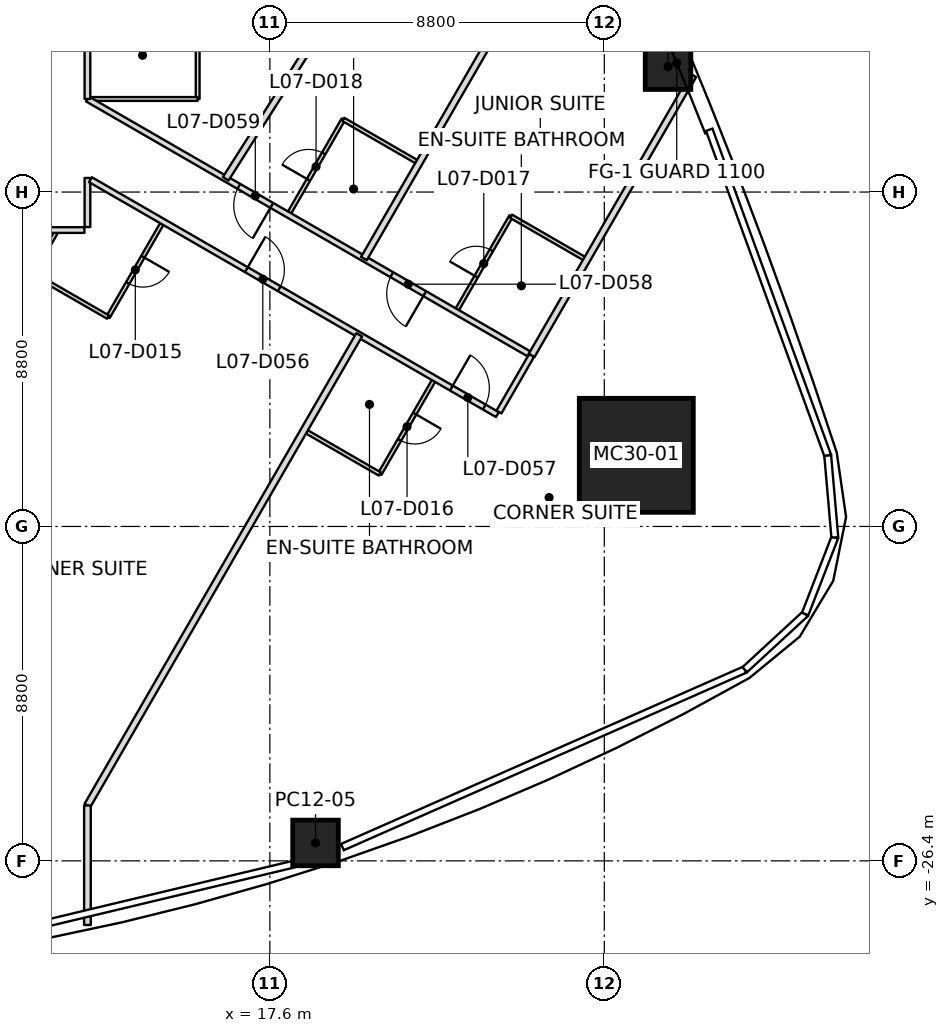
"""IFC4 building model, lengths in metres.
Left out: names, types, materials, properties, quantities, classifications, styles, units other than length and angle.
Written with IfcOpenShell. Run it as: python <this file> out.ifc"""

import sys

from ifc_helpers import new_model, si_unit, direction, frame, frame_2d, origin, origin_2d, place, context, subcontext, project, spatial, rectangle, extrude, clip, halfspace, element, fill, save


model = new_model("IFC4")
c1 = context("Model", 3, precision=1e-05, world=origin(), true_north=direction((0.0, 1.0)))
c2 = subcontext(c1, "Body", "Model", "MODEL_VIEW")
j1 = project(units=[si_unit("LENGTHUNIT", "METRE"), si_unit("PLANEANGLEUNIT", "RADIAN")], contexts=[c1])
p1 = place(None, origin())
s1 = spatial("IfcSite", under=j1, at=p1, CompositionType="ELEMENT")
p2 = place(p1, origin())
s2 = spatial("IfcBuilding", under=s1, at=p2, CompositionType="ELEMENT")
p3 = place(p2, frame((0.0, 0.0, 48.0)))
s3 = spatial("IfcBuildingStorey", under=s2, at=p3, CompositionType="ELEMENT", Elevation=48.0)
p4 = place(p3, frame((27.242, -15.728, 0.0), z_axis=(-0.030597838594, 0.017672889533, 0.99937552564), x_axis=(0.99953177652, 0.000541005533, 0.030593055416)))
e1 = element("IfcColumn", 1, at=p4, inside=s3, PredefinedType="COLUMN", context=c2, shape_type="SweptSolid", body=[
    clip(extrude(rectangle(XDim=3.0, YDim=3.0, at=origin_2d()), origin(), (0.0, 0.0, 1.0), 3.702), halfspace(frame((0.0, 0.0, 0.018)), True)),
])
p5 = place(p3, frame((18.802, -25.928, 0.0), z_axis=(-0.019020345186, 0.17825893475, 0.983799765527), x_axis=(0.950332394894, 0.308956292564, -0.037607824987)))
e2 = element("IfcColumn", 2, at=p5, inside=s3, PredefinedType="COLUMN", context=c2, shape_type="SweptSolid", body=[
    clip(clip(extrude(rectangle(XDim=1.2, YDim=1.2, at=origin_2d()), origin(), (0.0, 0.0, 1.0), 3.761), halfspace(frame((0.0, 0.0, 0.008)), True)), halfspace(frame((0.0, 0.0, 3.76)), False)),
])
p6 = place(p3, frame((28.077, -5.5, 0.0), z_axis=(-0.019526598325, 0.011016695677, 0.999748640596), x_axis=(-0.381957446123, 0.924011503162, -0.017642317722)))
e3 = element("IfcColumn", 3, at=p6, inside=s3, PredefinedType="COLUMN", context=c2, shape_type="SweptSolid", body=[
    clip(extrude(rectangle(XDim=1.2, YDim=1.2, at=origin_2d()), origin(), (0.0, 0.0, 1.0), 3.701), halfspace(frame((0.0, 0.0, 0.005)), True)),
])
p7 = place(p3, frame((19.95, -12.558, 0.0), z_axis=(0.0, 0.0, 1.0), x_axis=(-0.500004228592, -0.866022962392, 0.0)))
e4 = element("IfcWall", 4, at=p7, inside=s3, PredefinedType="PARTITIONING", context=c2, shape_type="SweptSolid", body=[
    extrude(rectangle(XDim=14.3, YDim=0.175, at=frame_2d((7.15, 0.0))), origin(), (0.0, 0.0, 1.0), 2.797),
])
p8 = place(p3, frame((12.8, -24.942, 0.0), z_axis=(0.0, 0.0, 1.0), x_axis=(0.0, -1.0, 0.0)))
e5 = element("IfcWall", 5, at=p8, inside=s3, PredefinedType="PARTITIONING", context=c2, shape_type="SweptSolid", body=[
    extrude(rectangle(XDim=3.146, YDim=0.175, at=frame_2d((1.573, 0.0))), origin(), (0.0, 0.0, 1.0), 2.934),
])
p9 = place(p3, frame((24.174, 3.728, 0.0), z_axis=(0.0, 0.0, 1.0), x_axis=(-0.536240308602, -0.844065359691, 0.0)))
e6 = element("IfcWall", 6, at=p9, inside=s3, PredefinedType="PARTITIONING", context=c2, shape_type="SweptSolid", body=[
    extrude(rectangle(XDim=14.428, YDim=0.175, at=frame_2d((7.214, 0.0))), origin(), (0.0, 0.0, 1.0), 2.947),
])
p10 = place(p3, frame((20.075, -10.551, 0.0), z_axis=(0.0, 0.0, 1.0), x_axis=(0.499996220184, 0.866027586051, 0.0)))
e7 = element("IfcWall", 7, at=p10, inside=s3, PredefinedType="PARTITIONING", context=c2, shape_type="SweptSolid", body=[
    extrude(rectangle(XDim=12.274, YDim=0.175, at=frame_2d((6.137, 0.0))), origin(), (0.0, 0.0, 1.0), 2.934),
])
p11 = place(p3, frame((24.488, -13.099, 0.0), z_axis=(0.0, 0.0, 1.0), x_axis=(0.500003147101, 0.866023586797, 0.0)))
e8 = element("IfcWall", 8, at=p11, inside=s3, PredefinedType="PARTITIONING", context=c2, shape_type="SweptSolid", body=[
    extrude(rectangle(XDim=8.508, YDim=0.175, at=frame_2d((4.254, 0.0))), origin(), (0.0, 0.0, 1.0), 2.934),
])
p12 = place(p3, frame((-12.72, -9.8, 0.0), z_axis=(0.0, 0.0, 1.0), x_axis=(1.0, 0.0, 0.0)))
e9 = element("IfcWall", 9, at=p12, inside=s3, PredefinedType="PARTITIONING", context=c2, shape_type="SweptSolid", body=[
    extrude(rectangle(XDim=25.44, YDim=0.15, at=frame_2d((12.72, 0.0))), origin(), (0.0, 0.0, 1.0), 2.947),
])
p13 = place(p12, frame((7.32, 0.0, 0.0)))
e10 = element("IfcOpeningElement", 10, at=p13, cuts=e9, PredefinedType="OPENING", context=c2, shape_type="SweptSolid", body=[
    extrude(rectangle(XDim=1.0, YDim=2.1, at=frame_2d((0.5, 1.05))), frame((0.0, 0.075, 0.0), z_axis=(0.0, -1.0, 0.0), x_axis=(1.0, 0.0, 0.0)), (0.0, 0.0, 1.0), 0.15),
])
p14 = place(p12, frame((11.52, 0.0, 0.0)))
e11 = element("IfcOpeningElement", 11, at=p14, cuts=e9, PredefinedType="OPENING", context=c2, shape_type="SweptSolid", body=[
    extrude(rectangle(XDim=1.0, YDim=2.1, at=frame_2d((0.5, 1.05))), frame((0.0, 0.075, 0.0), z_axis=(0.0, -1.0, 0.0), x_axis=(1.0, 0.0, 0.0)), (0.0, 0.0, 1.0), 0.15),
])
p15 = place(p12, frame((15.72, 0.0, 0.0)))
e12 = element("IfcOpeningElement", 12, at=p15, cuts=e9, PredefinedType="OPENING", context=c2, shape_type="SweptSolid", body=[
    extrude(rectangle(XDim=1.0, YDim=2.1, at=frame_2d((0.5, 1.05))), frame((0.0, 0.075, 0.0), z_axis=(0.0, -1.0, 0.0), x_axis=(1.0, 0.0, 0.0)), (0.0, 0.0, 1.0), 0.15),
])
p16 = place(p12, frame((19.92, 0.0, 0.0)))
e13 = element("IfcOpeningElement", 13, at=p16, cuts=e9, PredefinedType="OPENING", context=c2, shape_type="SweptSolid", body=[
    extrude(rectangle(XDim=1.0, YDim=2.1, at=frame_2d((0.5, 1.05))), frame((0.0, 0.075, 0.0), z_axis=(0.0, -1.0, 0.0), x_axis=(1.0, 0.0, 0.0)), (0.0, 0.0, 1.0), 0.15),
])
p17 = place(p3, frame((12.8, -9.72, 0.0), z_axis=(0.0, 0.0, 1.0), x_axis=(0.0, 1.0, 0.0)))
e14 = element("IfcWall", 14, at=p17, inside=s3, PredefinedType="PARTITIONING", context=c2, shape_type="SweptSolid", body=[
    extrude(rectangle(XDim=1.291, YDim=0.15, at=frame_2d((0.646, 0.0))), origin(), (0.0, 0.0, 1.0), 2.797),
])
p18 = place(p3, frame((12.879, -8.475, 0.0), z_axis=(0.0, 0.0, 1.0), x_axis=(0.866021836803, -0.500006178143, 0.0)))
e15 = element("IfcWall", 15, at=p18, inside=s3, PredefinedType="PARTITIONING", context=c2, shape_type="SweptSolid", body=[
    extrude(rectangle(XDim=12.365, YDim=0.15, at=frame_2d((6.182, 0.0))), origin(), (0.0, 0.0, 1.0), 2.797),
])
p19 = place(p18, frame((4.737, 0.0, 0.0)))
e16 = element("IfcOpeningElement", 16, at=p19, cuts=e15, PredefinedType="OPENING", context=c2, shape_type="SweptSolid", body=[
    extrude(rectangle(XDim=1.0, YDim=2.1, at=frame_2d((0.5, 1.05))), frame((0.0, 0.075, 0.0), z_axis=(0.0, -1.0, 0.0), x_axis=(1.0, 0.0, 0.0)), (0.0, 0.0, 1.0), 0.15),
])
p20 = place(p18, frame((10.965, 0.0, 0.0)))
e17 = element("IfcOpeningElement", 17, at=p20, cuts=e15, PredefinedType="OPENING", context=c2, shape_type="SweptSolid", body=[
    extrude(rectangle(XDim=1.0, YDim=2.1, at=frame_2d((0.5, 1.05))), frame((0.0, 0.075, 0.0), z_axis=(0.0, -1.0, 0.0), x_axis=(1.0, 0.0, 0.0)), (0.0, 0.0, 1.0), 0.15),
])
p21 = place(p3, frame((23.627, -14.588, 0.0), z_axis=(0.0, 0.0, 1.0), x_axis=(0.500062383118, 0.865989383878, 0.0)))
e18 = element("IfcWall", 18, at=p21, inside=s3, PredefinedType="PARTITIONING", context=c2, shape_type="SweptSolid", body=[
    extrude(rectangle(XDim=1.72, YDim=0.15, at=frame_2d((0.86, 0.0))), origin(), (0.0, 0.0, 1.0), 2.797),
])
p22 = place(p3, frame((24.418, -13.059, 0.0), z_axis=(0.0, 0.0, 1.0), x_axis=(-0.866024967305, 0.500000756004, 0.0)))
e19 = element("IfcWall", 19, at=p22, inside=s3, PredefinedType="PARTITIONING", context=c2, shape_type="SweptSolid", body=[
    extrude(rectangle(XDim=13.416, YDim=0.15, at=frame_2d((6.708, 0.0))), origin(), (0.0, 0.0, 1.0), 2.947),
])
p23 = place(p22, frame((3.168, 0.0, 0.0)))
e20 = element("IfcOpeningElement", 20, at=p23, cuts=e19, PredefinedType="OPENING", context=c2, shape_type="SweptSolid", body=[
    extrude(rectangle(XDim=1.0, YDim=2.1, at=frame_2d((0.5, 1.05))), frame((0.0, 0.075, 0.0), z_axis=(0.0, -1.0, 0.0), x_axis=(1.0, 0.0, 0.0)), (0.0, 0.0, 1.0), 0.15),
])
p24 = place(p22, frame((7.815, 0.0, 0.0)))
e21 = element("IfcOpeningElement", 21, at=p24, cuts=e19, PredefinedType="OPENING", context=c2, shape_type="SweptSolid", body=[
    extrude(rectangle(XDim=1.0, YDim=2.1, at=frame_2d((0.5, 1.05))), frame((0.0, 0.075, 0.0), z_axis=(0.0, -1.0, 0.0), x_axis=(1.0, 0.0, 0.0)), (0.0, 0.0, 1.0), 0.15),
])
p25 = place(p3, frame((12.8, -6.351, 0.0), z_axis=(0.0, 0.0, 1.0), x_axis=(0.0, 1.0, 0.0)))
e22 = element("IfcWall", 22, at=p25, inside=s3, PredefinedType="PARTITIONING", context=c2, shape_type="SweptSolid", body=[
    extrude(rectangle(XDim=16.071, YDim=0.15, at=frame_2d((8.035, 0.0))), origin(), (0.0, 0.0, 1.0), 3.017),
])
p26 = place(p25, frame((6.676, 0.0, 0.0)))
e23 = element("IfcOpeningElement", 23, at=p26, cuts=e22, PredefinedType="OPENING", context=c2, shape_type="SweptSolid", body=[
    extrude(rectangle(XDim=1.0, YDim=2.1, at=frame_2d((0.5, 1.05))), frame((0.0, 0.075, 0.0), z_axis=(0.0, -1.0, 0.0), x_axis=(1.0, 0.0, 0.0)), (0.0, 0.0, 1.0), 0.15),
])
p27 = place(p25, frame((14.751, 0.0, 0.0)))
e24 = element("IfcOpeningElement", 24, at=p27, cuts=e22, PredefinedType="OPENING", context=c2, shape_type="SweptSolid", body=[
    extrude(rectangle(XDim=1.0, YDim=2.1, at=frame_2d((0.5, 1.05))), frame((0.0, 0.075, 0.0), z_axis=(0.0, -1.0, 0.0), x_axis=(1.0, 0.0, 0.0)), (0.0, 0.0, 1.0), 0.15),
])
p28 = place(p3, frame((14.777, -9.605, 0.0), z_axis=(0.0, 0.0, 1.0), x_axis=(-0.499999802827, -0.866025517622, 0.0)))
e25 = element("IfcWall", 25, at=p28, inside=s3, PredefinedType="PARTITIONING", context=c2, shape_type="SweptSolid", body=[
    extrude(rectangle(XDim=2.87, YDim=0.1, at=frame_2d((1.435, 0.0))), origin(), (0.0, 0.0, 1.0), 2.797),
])
p29 = place(p28, frame((1.035, 0.0, 0.0)))
e26 = element("IfcOpeningElement", 26, at=p29, cuts=e25, PredefinedType="OPENING", context=c2, shape_type="SweptSolid", body=[
    extrude(rectangle(XDim=0.8, YDim=2.1, at=frame_2d((0.4, 1.05))), frame((0.0, 0.05, 0.0), z_axis=(0.0, -1.0, 0.0), x_axis=(1.0, 0.0, 0.0)), (0.0, 0.0, 1.0), 0.1),
])
p30 = place(p3, frame((13.342, -12.091, 0.0), z_axis=(0.0, 0.0, 1.0), x_axis=(-0.86602648383, 0.499998129301, 0.0)))
e27 = element("IfcWall", 27, at=p30, inside=s3, PredefinedType="PARTITIONING", context=c2, shape_type="SweptSolid", body=[
    extrude(rectangle(XDim=2.3, YDim=0.1, at=frame_2d((1.15, 0.0))), origin(), (0.0, 0.0, 1.0), 2.947),
])
p31 = place(p3, frame((11.35, -10.941, 0.0), z_axis=(0.0, 0.0, 1.0), x_axis=(0.499865263774, 0.866103179807, 0.0)))
e28 = element("IfcWall", 28, at=p31, inside=s3, PredefinedType="PARTITIONING", context=c2, shape_type="SweptSolid", body=[
    extrude(rectangle(XDim=1.282, YDim=0.1, at=frame_2d((0.641, 0.0))), origin(), (0.0, 0.0, 1.0), 3.15),
])
p32 = place(p3, frame((15.7, -4.051, 0.0), z_axis=(0.0, 0.0, 1.0), x_axis=(0.0, -1.0, 0.0)))
e29 = element("IfcWall", 29, at=p32, inside=s3, PredefinedType="PARTITIONING", context=c2, shape_type="SweptSolid", body=[
    extrude(rectangle(XDim=2.3, YDim=0.1, at=frame_2d((1.15, 0.0))), origin(), (0.0, 0.0, 1.0), 2.947),
])
p33 = place(p3, frame((15.7, -6.351, 0.0), z_axis=(0.0, 0.0, 1.0), x_axis=(-1.0, 0.0, 0.0)))
e30 = element("IfcWall", 30, at=p33, inside=s3, PredefinedType="PARTITIONING", context=c2, shape_type="SweptSolid", body=[
    extrude(rectangle(XDim=2.84, YDim=0.1, at=frame_2d((1.42, 0.0))), origin(), (0.0, 0.0, 1.0), 2.947),
])
p34 = place(p3, frame((18.098, -9.375, 0.0), z_axis=(0.0, 0.0, 1.0), x_axis=(0.499936001555, 0.866062350151, 0.0)))
e31 = element("IfcWall", 31, at=p34, inside=s3, PredefinedType="PARTITIONING", context=c2, shape_type="SweptSolid", body=[
    extrude(rectangle(XDim=2.87, YDim=0.1, at=frame_2d((1.435, 0.0))), origin(), (0.0, 0.0, 1.0), 2.947),
])
p35 = place(p34, frame((1.035, 0.0, 0.0)))
e32 = element("IfcOpeningElement", 32, at=p35, cuts=e31, PredefinedType="OPENING", context=c2, shape_type="SweptSolid", body=[
    extrude(rectangle(XDim=0.8, YDim=2.1, at=frame_2d((0.4, 1.05))), frame((0.0, 0.05, 0.0), z_axis=(0.0, -1.0, 0.0), x_axis=(1.0, 0.0, 0.0)), (0.0, 0.0, 1.0), 0.1),
])
p36 = place(p3, frame((19.533, -6.889, 0.0), z_axis=(0.0, 0.0, 1.0), x_axis=(0.866017224141, -0.500014167291, 0.0)))
e33 = element("IfcWall", 33, at=p36, inside=s3, PredefinedType="PARTITIONING", context=c2, shape_type="SweptSolid", body=[
    extrude(rectangle(XDim=2.27, YDim=0.1, at=frame_2d((1.135, 0.0))), origin(), (0.0, 0.0, 1.0), 2.947),
])
p37 = place(p3, frame((21.927, -13.733, 0.0), z_axis=(0.0, 0.0, 1.0), x_axis=(-0.499936001555, -0.866062350151, 0.0)))
e34 = element("IfcWall", 34, at=p37, inside=s3, PredefinedType="PARTITIONING", context=c2, shape_type="SweptSolid", body=[
    extrude(rectangle(XDim=2.87, YDim=0.1, at=frame_2d((1.435, 0.0))), origin(), (0.0, 0.0, 1.0), 3.15),
])
p38 = place(p37, frame((1.035, 0.0, 0.0)))
e35 = element("IfcOpeningElement", 35, at=p38, cuts=e34, PredefinedType="OPENING", context=c2, shape_type="SweptSolid", body=[
    extrude(rectangle(XDim=0.8, YDim=2.1, at=frame_2d((0.4, 1.05))), frame((0.0, 0.05, 0.0), z_axis=(0.0, -1.0, 0.0), x_axis=(1.0, 0.0, 0.0)), (0.0, 0.0, 1.0), 0.1),
])
p39 = place(p3, frame((20.492, -16.219, 0.0), z_axis=(0.0, 0.0, 1.0), x_axis=(-0.866044110172, 0.499967598186, 0.0)))
e36 = element("IfcWall", 36, at=p39, inside=s3, PredefinedType="PARTITIONING", context=c2, shape_type="SweptSolid", body=[
    extrude(rectangle(XDim=2.27, YDim=0.1, at=frame_2d((1.135, 0.0))), origin(), (0.0, 0.0, 1.0), 3.15),
])
p40 = place(p3, frame((22.511, -11.923, 0.0), z_axis=(0.0, 0.0, 1.0), x_axis=(0.500036638401, 0.866004249561, 0.0)))
e37 = element("IfcWall", 37, at=p40, inside=s3, PredefinedType="PARTITIONING", context=c2, shape_type="SweptSolid", body=[
    extrude(rectangle(XDim=2.87, YDim=0.1, at=frame_2d((1.435, 0.0))), origin(), (0.0, 0.0, 1.0), 3.15),
])
p41 = place(p40, frame((1.035, 0.0, 0.0)))
e38 = element("IfcOpeningElement", 38, at=p41, cuts=e37, PredefinedType="OPENING", context=c2, shape_type="SweptSolid", body=[
    extrude(rectangle(XDim=0.8, YDim=2.1, at=frame_2d((0.4, 1.05))), frame((0.0, 0.05, 0.0), z_axis=(0.0, -1.0, 0.0), x_axis=(1.0, 0.0, 0.0)), (0.0, 0.0, 1.0), 0.1),
])
p42 = place(p3, frame((23.946, -9.437, 0.0), z_axis=(0.0, 0.0, 1.0), x_axis=(0.866017224141, -0.500014167291, 0.0)))
e39 = element("IfcWall", 39, at=p42, inside=s3, PredefinedType="PARTITIONING", context=c2, shape_type="SweptSolid", body=[
    extrude(rectangle(XDim=2.27, YDim=0.1, at=frame_2d((1.135, 0.0))), origin(), (0.0, 0.0, 1.0), 3.15),
])
p43 = place(p19, origin())
e40 = element("IfcDoor", 40, at=p43, inside=s3, OperationType="SINGLE_SWING_LEFT", PredefinedType="DOOR", context=c2, shape_type="SweptSolid", body=[
    extrude(rectangle(XDim=1.0, YDim=2.1, at=frame_2d((0.5, 1.05))), frame((0.0, 0.025, 0.0), z_axis=(0.0, -1.0, 0.0), x_axis=(1.0, 0.0, 0.0)), (0.0, 0.0, 1.0), 0.05),
])
fill(e16, e40)
p44 = place(p29, origin())
e41 = element("IfcDoor", 41, at=p44, inside=s3, OperationType="SINGLE_SWING_LEFT", PredefinedType="DOOR", context=c2, shape_type="SweptSolid", body=[
    extrude(rectangle(XDim=0.8, YDim=2.1, at=frame_2d((0.4, 1.05))), frame((0.0, 0.025, 0.0), z_axis=(0.0, -1.0, 0.0), x_axis=(1.0, 0.0, 0.0)), (0.0, 0.0, 1.0), 0.05),
])
fill(e26, e41)
p45 = place(p20, origin())
e42 = element("IfcDoor", 42, at=p45, inside=s3, OperationType="SINGLE_SWING_LEFT", PredefinedType="DOOR", context=c2, shape_type="SweptSolid", body=[
    extrude(rectangle(XDim=1.0, YDim=2.1, at=frame_2d((0.5, 1.05))), frame((0.0, 0.025, 0.0), z_axis=(0.0, -1.0, 0.0), x_axis=(1.0, 0.0, 0.0)), (0.0, 0.0, 1.0), 0.05),
])
fill(e17, e42)
p46 = place(p38, origin())
e43 = element("IfcDoor", 43, at=p46, inside=s3, OperationType="SINGLE_SWING_LEFT", PredefinedType="DOOR", context=c2, shape_type="SweptSolid", body=[
    extrude(rectangle(XDim=0.8, YDim=2.1, at=frame_2d((0.4, 1.05))), frame((0.0, 0.025, 0.0), z_axis=(0.0, -1.0, 0.0), x_axis=(1.0, 0.0, 0.0)), (0.0, 0.0, 1.0), 0.05),
])
fill(e35, e43)
p47 = place(p23, origin())
e44 = element("IfcDoor", 44, at=p47, inside=s3, OperationType="SINGLE_SWING_LEFT", PredefinedType="DOOR", context=c2, shape_type="SweptSolid", body=[
    extrude(rectangle(XDim=1.0, YDim=2.1, at=frame_2d((0.5, 1.05))), frame((0.0, 0.025, 0.0), z_axis=(0.0, -1.0, 0.0), x_axis=(1.0, 0.0, 0.0)), (0.0, 0.0, 1.0), 0.05),
])
fill(e20, e44)
p48 = place(p41, origin())
e45 = element("IfcDoor", 45, at=p48, inside=s3, OperationType="SINGLE_SWING_RIGHT", PredefinedType="DOOR", context=c2, shape_type="SweptSolid", body=[
    extrude(rectangle(XDim=0.8, YDim=2.1, at=frame_2d((0.4, 1.05))), frame((0.0, 0.025, 0.0), z_axis=(0.0, -1.0, 0.0), x_axis=(1.0, 0.0, 0.0)), (0.0, 0.0, 1.0), 0.05),
])
fill(e38, e45)
p49 = place(p24, origin())
e46 = element("IfcDoor", 46, at=p49, inside=s3, OperationType="SINGLE_SWING_LEFT", PredefinedType="DOOR", context=c2, shape_type="SweptSolid", body=[
    extrude(rectangle(XDim=1.0, YDim=2.1, at=frame_2d((0.5, 1.05))), frame((0.0, 0.025, 0.0), z_axis=(0.0, -1.0, 0.0), x_axis=(1.0, 0.0, 0.0)), (0.0, 0.0, 1.0), 0.05),
])
fill(e21, e46)
p50 = place(p35, origin())
e47 = element("IfcDoor", 47, at=p50, inside=s3, OperationType="SINGLE_SWING_LEFT", PredefinedType="DOOR", context=c2, shape_type="SweptSolid", body=[
    extrude(rectangle(XDim=0.8, YDim=2.1, at=frame_2d((0.4, 1.05))), frame((0.0, 0.025, 0.0), z_axis=(0.0, -1.0, 0.0), x_axis=(1.0, 0.0, 0.0)), (0.0, 0.0, 1.0), 0.05),
])
fill(e32, e47)
save(model, sys.argv[1])
